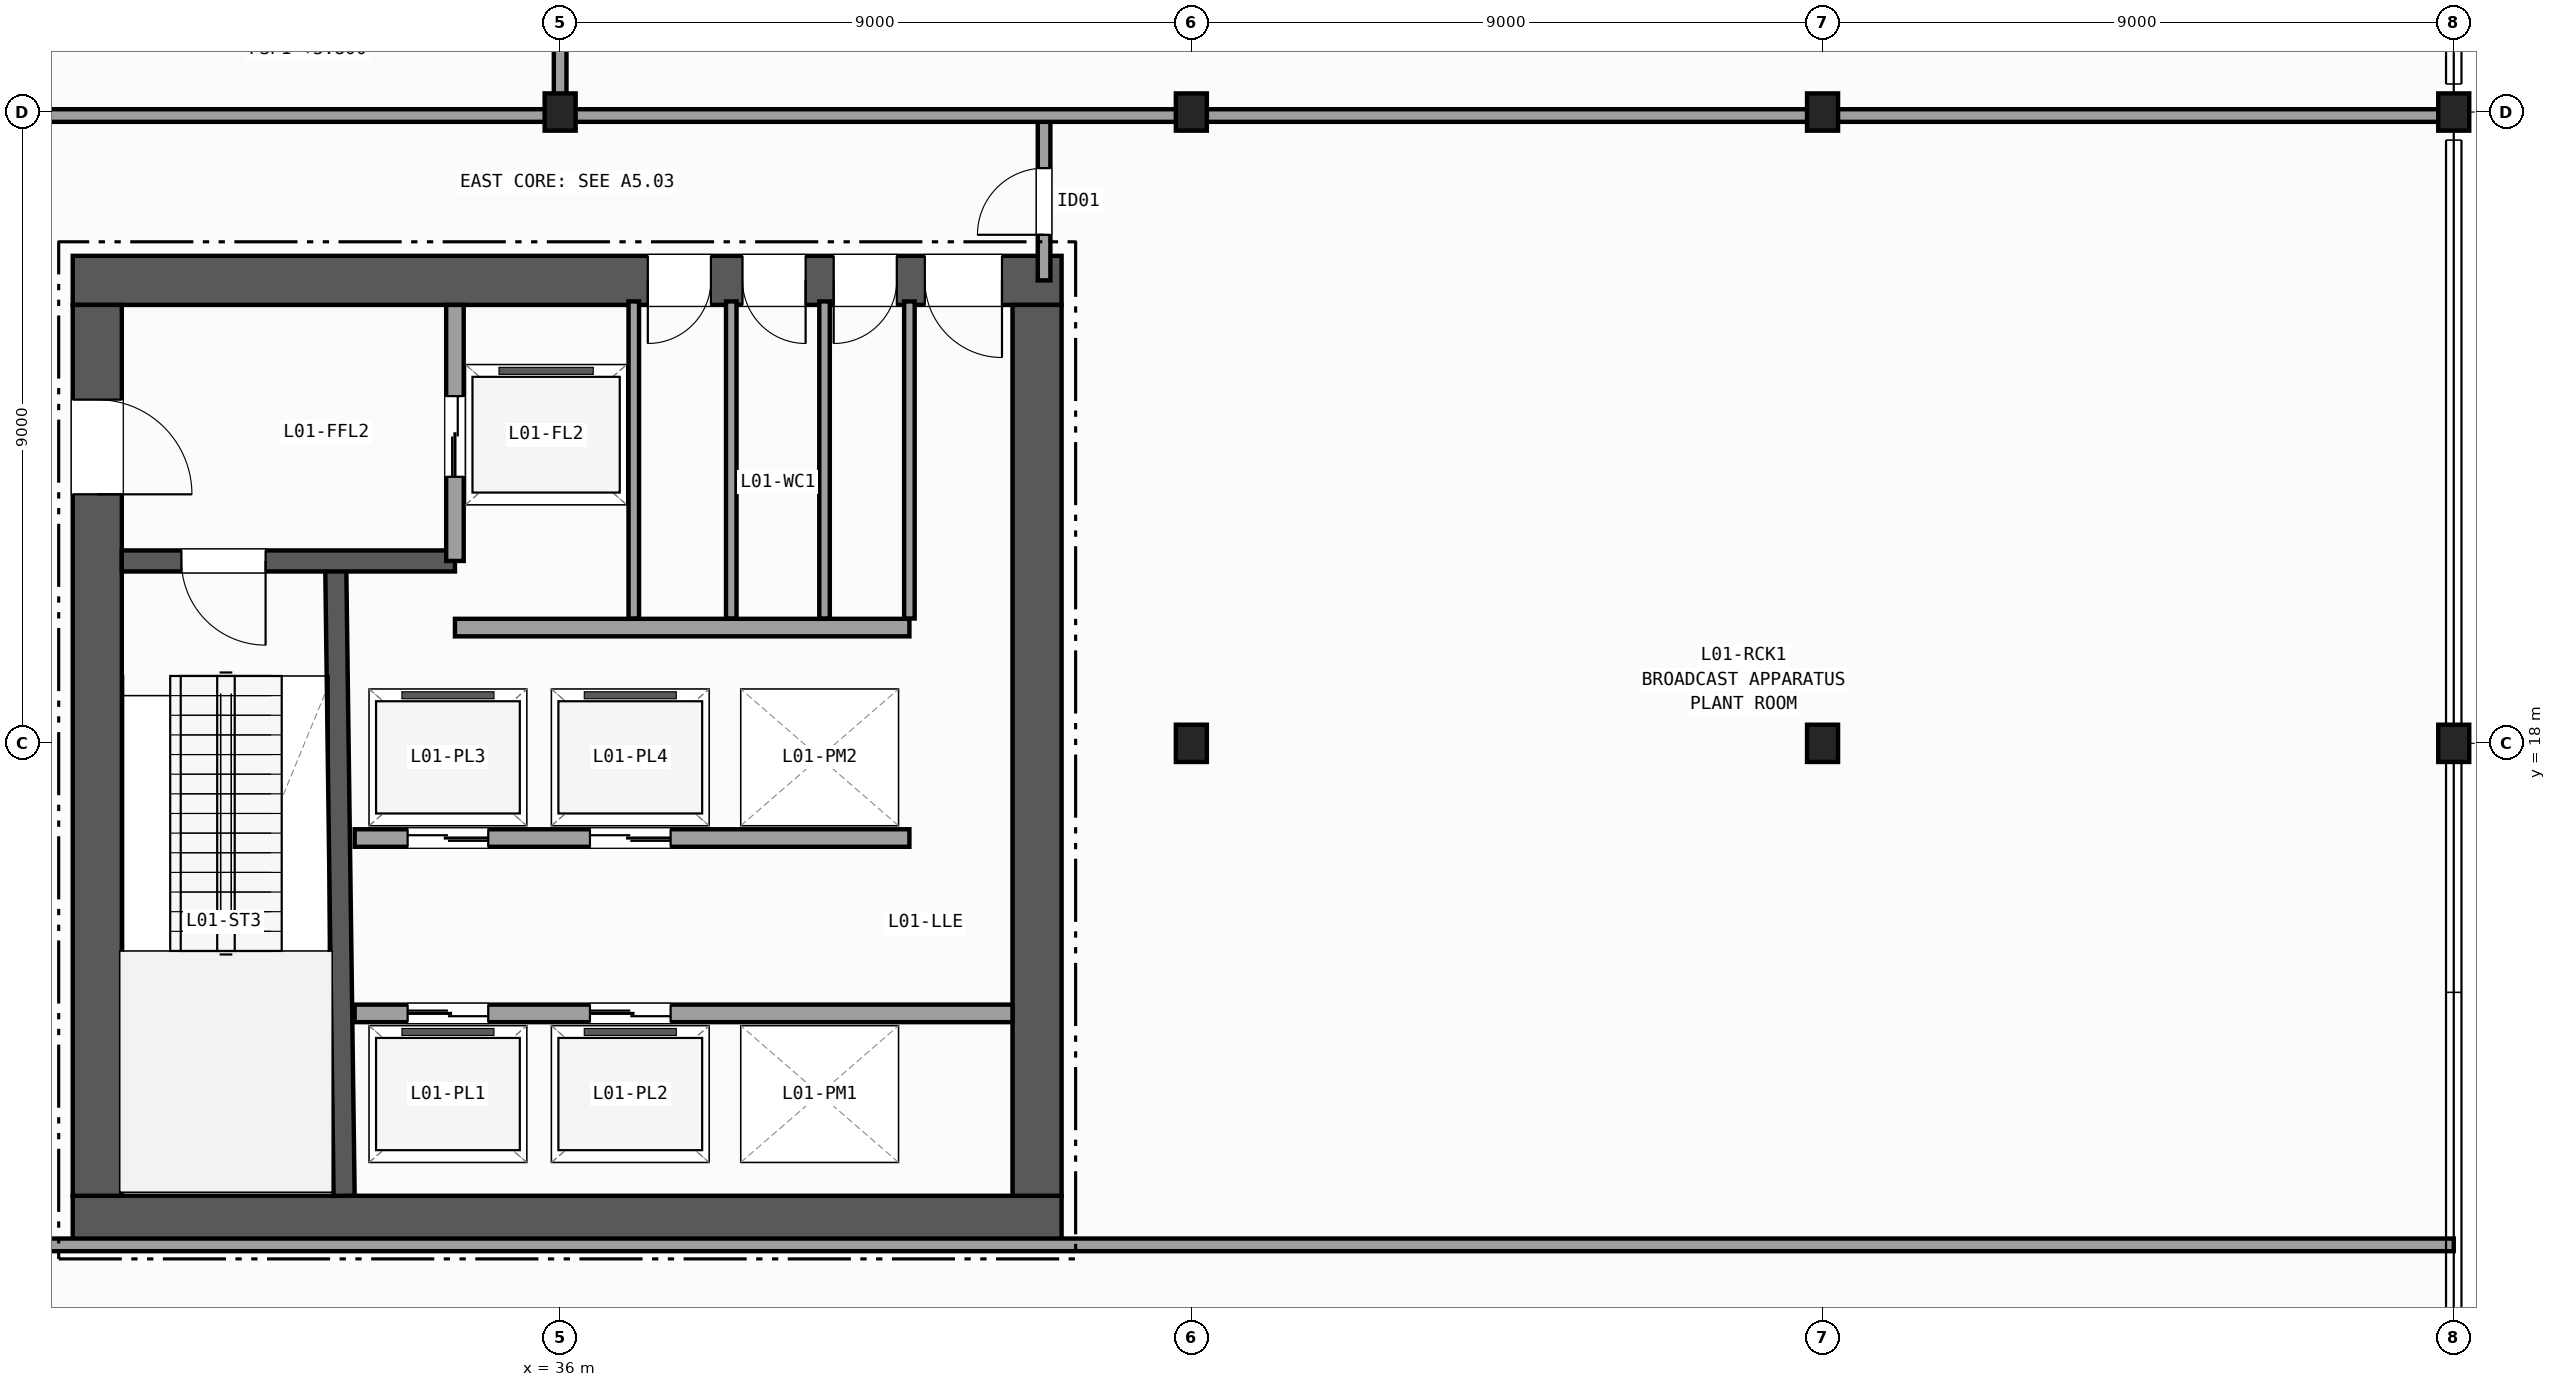
"""IFC4 building model, lengths in metres.
Left out: names, types, materials, properties, quantities, classifications, styles, units other than length and angle.
Written with IfcOpenShell. Run it as: python <this file> out.ifc"""

import sys

from ifc_helpers import new_model, si_unit, direction, frame, frame_2d, origin, origin_2d, place, context, subcontext, project, spatial, rectangle, i_section, extrude, element, fill, save


model = new_model("IFC4")
c1 = context("Model", 3, precision=1e-05, world=origin(), true_north=direction((0.0, 1.0)))
c2 = subcontext(c1, "Body", "Model", "MODEL_VIEW")
j1 = project(units=[si_unit("LENGTHUNIT", "METRE"), si_unit("PLANEANGLEUNIT", "RADIAN")], contexts=[c1])
p1 = place(None, origin())
s1 = spatial("IfcSite", under=j1, at=p1, CompositionType="ELEMENT")
p2 = place(p1, origin())
s2 = spatial("IfcBuilding", under=s1, at=p2, CompositionType="ELEMENT")
p3 = place(p2, frame((0.0, 0.0, 5.8)))
s3 = spatial("IfcBuildingStorey", under=s2, at=p3, CompositionType="ELEMENT", Elevation=5.8)
for number, where, z_axis, x_axis in (
    (1, (36.0, 27.0, 0.0), (0.0, 0.0, 1.0), (1.0, 0.0, 0.0)),
    (2, (45.0, 18.0, 0.0), (0.0, 0.0, 1.0), (1.0, 0.0, 0.0)),
    (3, (45.0, 27.0, 0.0), (0.0, 0.0, 1.0), (1.0, 0.0, 0.0)),
    (4, (54.0, 18.0, 0.0), (0.0, 0.0, 1.0), (1.0, 0.0, 0.0)),
    (5, (54.0, 27.0, 0.0), (0.0, 0.0, 1.0), (1.0, 0.0, 0.0)),
    (6, (63.0, 18.0, 0.0), (0.0, 0.0, 1.0), (1.0, 0.0, 0.0)),
    (7, (63.0, 27.0, 0.0), (0.0, 0.0, 1.0), (1.0, 0.0, 0.0)),
):
    element("IfcColumn", number, at=place(p3, frame(where, z_axis=z_axis, x_axis=x_axis)), inside=s3, PredefinedType="COLUMN", context=c2, shape_type="SweptSolid", body=[
        extrude(i_section(OverallWidth=0.442, OverallDepth=0.531, WebThickness=0.066, FlangeThickness=0.106, FilletRadius=0.015, at=origin_2d()), origin(), (0.0, 0.0, 1.0), 5.2),
    ])
p4 = place(p3, frame((29.05, 11.2, 0.0), z_axis=(0.0, 0.0, 1.0), x_axis=(1.0, 0.0, 0.0)))
e8 = element("IfcWall", 8, at=p4, inside=s3, PredefinedType="SHEAR", context=c2, shape_type="SweptSolid", body=[
    extrude(rectangle(XDim=14.1, YDim=0.7, at=frame_2d((7.05, 0.0))), origin(), (0.0, 0.0, 1.0), 4.88),
])
p5 = place(p3, frame((43.15, 24.6, 0.0), z_axis=(0.0, 0.0, 1.0), x_axis=(-1.0, 0.0, 0.0)))
e9 = element("IfcWall", 9, at=p5, inside=s3, PredefinedType="SHEAR", context=c2, shape_type="SweptSolid", body=[
    extrude(rectangle(XDim=14.1, YDim=0.7, at=frame_2d((7.05, 0.0))), origin(), (0.0, 0.0, 1.0), 4.88),
])
p6 = place(p5, frame((0.85, 0.0, 0.0)))
e10 = element("IfcOpeningElement", 10, at=p6, cuts=e9, PredefinedType="OPENING", context=c2, shape_type="SweptSolid", body=[
    extrude(rectangle(XDim=1.1, YDim=2.15, at=frame_2d((0.55, 1.075))), frame((0.0, 0.36, 0.0), z_axis=(0.0, -1.0, 0.0), x_axis=(1.0, 0.0, 0.0)), (0.0, 0.0, 1.0), 0.72),
])
p7 = place(p5, frame((2.35, 0.0, 0.0)))
e11 = element("IfcOpeningElement", 11, at=p7, cuts=e9, PredefinedType="OPENING", context=c2, shape_type="SweptSolid", body=[
    extrude(rectangle(XDim=0.9, YDim=2.1, at=frame_2d((0.45, 1.05))), frame((0.0, 0.36, 0.0), z_axis=(0.0, -1.0, 0.0), x_axis=(1.0, 0.0, 0.0)), (0.0, 0.0, 1.0), 0.72),
])
p8 = place(p5, frame((3.65, 0.0, 0.0)))
e12 = element("IfcOpeningElement", 12, at=p8, cuts=e9, PredefinedType="OPENING", context=c2, shape_type="SweptSolid", body=[
    extrude(rectangle(XDim=0.9, YDim=2.1, at=frame_2d((0.45, 1.05))), frame((0.0, 0.36, 0.0), z_axis=(0.0, -1.0, 0.0), x_axis=(1.0, 0.0, 0.0)), (0.0, 0.0, 1.0), 0.72),
])
p9 = place(p5, frame((5.0, 0.0, 0.0)))
e13 = element("IfcOpeningElement", 13, at=p9, cuts=e9, PredefinedType="OPENING", context=c2, shape_type="SweptSolid", body=[
    extrude(rectangle(XDim=0.9, YDim=2.1, at=frame_2d((0.45, 1.05))), frame((0.0, 0.36, 0.0), z_axis=(0.0, -1.0, 0.0), x_axis=(1.0, 0.0, 0.0)), (0.0, 0.0, 1.0), 0.72),
])
p10 = place(p3, frame((29.4, 24.25, 0.0), z_axis=(0.0, 0.0, 1.0), x_axis=(0.0, -1.0, 0.0)))
e14 = element("IfcWall", 14, at=p10, inside=s3, PredefinedType="SHEAR", context=c2, shape_type="SweptSolid", body=[
    extrude(rectangle(XDim=12.7, YDim=0.7, at=frame_2d((6.35, 0.0))), origin(), (0.0, 0.0, 1.0), 4.88),
])
p11 = place(p10, frame((1.35, 0.0, 0.0)))
e15 = element("IfcOpeningElement", 15, at=p11, cuts=e14, PredefinedType="OPENING", context=c2, shape_type="SweptSolid", body=[
    extrude(rectangle(XDim=1.35, YDim=2.15, at=frame_2d((0.675, 1.075))), frame((0.0, 0.36, 0.0), z_axis=(0.0, -1.0, 0.0), x_axis=(1.0, 0.0, 0.0)), (0.0, 0.0, 1.0), 0.72),
])
p12 = place(p3, frame((42.8, 11.55, 0.0), z_axis=(0.0, 0.0, 1.0), x_axis=(0.0, 1.0, 0.0)))
e16 = element("IfcWall", 16, at=p12, inside=s3, PredefinedType="SHEAR", context=c2, shape_type="SweptSolid", body=[
    extrude(rectangle(XDim=12.7, YDim=0.7, at=frame_2d((6.35, 0.0))), origin(), (0.0, 0.0, 1.0), 4.88),
])
p13 = place(p3, frame((32.92, 11.55, 0.0), z_axis=(0.0, 0.0, 1.0), x_axis=(-0.01331804616, 0.99991131089, 0.0)))
e17 = element("IfcWall", 17, at=p13, inside=s3, PredefinedType="SHEAR", context=c2, shape_type="SweptSolid", body=[
    extrude(rectangle(XDim=9.001, YDim=0.3, at=frame_2d((4.5, 0.0))), origin(), (0.0, 0.0, 1.0), 4.88),
])
p14 = place(p3, frame((34.5, 20.6, 0.0), z_axis=(0.0, 0.0, 1.0), x_axis=(-1.0, 0.0, 0.0)))
e18 = element("IfcWall", 18, at=p14, inside=s3, PredefinedType="SHEAR", context=c2, shape_type="SweptSolid", body=[
    extrude(rectangle(XDim=4.75, YDim=0.3, at=frame_2d((2.375, 0.0))), origin(), (0.0, 0.0, 1.0), 4.88),
])
p15 = place(p14, frame((2.7, 0.0, 0.0)))
e19 = element("IfcOpeningElement", 19, at=p15, cuts=e18, PredefinedType="OPENING", context=c2, shape_type="SweptSolid", body=[
    extrude(rectangle(XDim=1.2, YDim=2.15, at=frame_2d((0.6, 1.075))), frame((0.0, 0.16, 0.0), z_axis=(0.0, -1.0, 0.0), x_axis=(1.0, 0.0, 0.0)), (0.0, 0.0, 1.0), 0.32),
])
p16 = place(p3, frame((34.5, 20.6, 0.0), z_axis=(0.0, 0.0, 1.0), x_axis=(0.0, 1.0, 0.0)))
e20 = element("IfcWall", 20, at=p16, inside=s3, PredefinedType="PARTITIONING", context=c2, shape_type="SweptSolid", body=[
    extrude(rectangle(XDim=3.65, YDim=0.25, at=frame_2d((1.825, 0.0))), origin(), (0.0, 0.0, 1.0), 4.88),
])
p17 = place(p16, frame((1.2, 0.0, 0.0)))
e21 = element("IfcOpeningElement", 21, at=p17, cuts=e20, PredefinedType="OPENING", context=c2, shape_type="SweptSolid", body=[
    extrude(rectangle(XDim=1.15, YDim=2.15, at=frame_2d((0.575, 1.075))), frame((0.0, 0.135, 0.0), z_axis=(0.0, -1.0, 0.0), x_axis=(1.0, 0.0, 0.0)), (0.0, 0.0, 1.0), 0.27),
])
p18 = place(p3, frame((34.5, 19.65, 0.0), z_axis=(0.0, 0.0, 1.0), x_axis=(1.0, 0.0, 0.0)))
e22 = element("IfcWall", 22, at=p18, inside=s3, PredefinedType="PARTITIONING", context=c2, shape_type="SweptSolid", body=[
    extrude(rectangle(XDim=6.48, YDim=0.25, at=frame_2d((3.24, 0.0))), origin(), (0.0, 0.0, 1.0), 4.88),
])
p19 = place(p3, frame((33.07, 14.15, 0.0), z_axis=(0.0, 0.0, 1.0), x_axis=(1.0, 0.0, 0.0)))
e23 = element("IfcWall", 23, at=p19, inside=s3, PredefinedType="PARTITIONING", context=c2, shape_type="SweptSolid", body=[
    extrude(rectangle(XDim=9.38, YDim=0.25, at=frame_2d((4.69, 0.0))), origin(), (0.0, 0.0, 1.0), 4.88),
])
p20 = place(p19, frame((0.755, 0.0, 0.0)))
e24 = element("IfcOpeningElement", 24, at=p20, cuts=e23, PredefinedType="OPENING", context=c2, shape_type="SweptSolid", body=[
    extrude(rectangle(XDim=1.15, YDim=2.15, at=frame_2d((0.575, 1.075))), frame((0.0, 0.135, 0.0), z_axis=(0.0, -1.0, 0.0), x_axis=(1.0, 0.0, 0.0)), (0.0, 0.0, 1.0), 0.27),
])
p21 = place(p19, frame((3.355, 0.0, 0.0)))
e25 = element("IfcOpeningElement", 25, at=p21, cuts=e23, PredefinedType="OPENING", context=c2, shape_type="SweptSolid", body=[
    extrude(rectangle(XDim=1.15, YDim=2.15, at=frame_2d((0.575, 1.075))), frame((0.0, 0.135, 0.0), z_axis=(0.0, -1.0, 0.0), x_axis=(1.0, 0.0, 0.0)), (0.0, 0.0, 1.0), 0.27),
])
p22 = place(p3, frame((40.98, 16.65, 0.0), z_axis=(0.0, 0.0, 1.0), x_axis=(-1.0, 0.0, 0.0)))
e26 = element("IfcWall", 26, at=p22, inside=s3, PredefinedType="PARTITIONING", context=c2, shape_type="SweptSolid", body=[
    extrude(rectangle(XDim=7.91, YDim=0.25, at=frame_2d((3.955, 0.0))), origin(), (0.0, 0.0, 1.0), 4.88),
])
p23 = place(p22, frame((6.005, 0.0, 0.0)))
e27 = element("IfcOpeningElement", 27, at=p23, cuts=e26, PredefinedType="OPENING", context=c2, shape_type="SweptSolid", body=[
    extrude(rectangle(XDim=1.15, YDim=2.15, at=frame_2d((0.575, 1.075))), frame((0.0, 0.135, 0.0), z_axis=(0.0, -1.0, 0.0), x_axis=(1.0, 0.0, 0.0)), (0.0, 0.0, 1.0), 0.27),
])
p24 = place(p22, frame((3.405, 0.0, 0.0)))
e28 = element("IfcOpeningElement", 28, at=p24, cuts=e26, PredefinedType="OPENING", context=c2, shape_type="SweptSolid", body=[
    extrude(rectangle(XDim=1.15, YDim=2.15, at=frame_2d((0.575, 1.075))), frame((0.0, 0.135, 0.0), z_axis=(0.0, -1.0, 0.0), x_axis=(1.0, 0.0, 0.0)), (0.0, 0.0, 1.0), 0.27),
])
for number, where, z_axis, x_axis in (
    (29, (37.05, 19.78, 0.0), (0.0, 0.0, 1.0), (0.0, 1.0, 0.0)),
    (30, (38.44, 19.78, 0.0), (0.0, 0.0, 1.0), (0.0, 1.0, 0.0)),
    (31, (39.77, 19.78, 0.0), (0.0, 0.0, 1.0), (0.0, 1.0, 0.0)),
    (32, (40.98, 19.78, 0.0), (0.0, 0.0, 1.0), (0.0, 1.0, 0.0)),
):
    element("IfcWall", number, at=place(p3, frame(where, z_axis=z_axis, x_axis=x_axis)), inside=s3, PredefinedType="PARTITIONING", context=c2, shape_type="SweptSolid", body=[
        extrude(rectangle(XDim=4.52, YDim=0.15, at=frame_2d((2.26, 0.0))), origin(), (0.0, 0.0, 1.0), 4.88),
    ])
p25 = place(p3, frame((24.65, 10.85, 0.0), z_axis=(0.0, 0.0, 1.0), x_axis=(1.0, 0.0, 0.0)))
e33 = element("IfcWall", 33, at=p25, inside=s3, PredefinedType="PARTITIONING", context=c2, shape_type="SweptSolid", body=[
    extrude(rectangle(XDim=38.35, YDim=0.18, at=frame_2d((19.175, 0.0))), origin(), (0.0, 0.0, 1.0), 4.005),
])
p26 = place(p25, frame((2.0, 0.0, 0.0)))
e34 = element("IfcOpeningElement", 34, at=p26, cuts=e33, PredefinedType="OPENING", context=c2, shape_type="SweptSolid", body=[
    extrude(rectangle(XDim=1.2, YDim=2.15, at=frame_2d((0.6, 1.075))), frame((0.0, 0.1, 0.0), z_axis=(0.0, -1.0, 0.0), x_axis=(1.0, 0.0, 0.0)), (0.0, 0.0, 1.0), 0.2),
])
p27 = place(p3, frame((42.9, 24.6, 0.0), z_axis=(0.0, 0.0, 1.0), x_axis=(0.0, 1.0, 0.0)))
e35 = element("IfcWall", 35, at=p27, inside=s3, PredefinedType="PARTITIONING", context=c2, shape_type="SweptSolid", body=[
    extrude(rectangle(XDim=2.35, YDim=0.18, at=frame_2d((1.175, 0.0))), origin(), (0.0, 0.0, 1.0), 3.933),
])
p28 = place(p27, frame((0.65, 0.0, 0.0)))
e36 = element("IfcOpeningElement", 36, at=p28, cuts=e35, PredefinedType="OPENING", context=c2, shape_type="SweptSolid", body=[
    extrude(rectangle(XDim=0.95, YDim=2.1, at=frame_2d((0.475, 1.05))), frame((0.0, 0.1, 0.0), z_axis=(0.0, -1.0, 0.0), x_axis=(1.0, 0.0, 0.0)), (0.0, 0.0, 1.0), 0.2),
])
p29 = place(p3, frame((27.1, 26.95, 0.0), z_axis=(0.0, 0.0, 1.0), x_axis=(1.0, 0.0, 0.0)))
e37 = element("IfcWall", 37, at=p29, inside=s3, PredefinedType="PARTITIONING", context=c2, shape_type="SweptSolid", body=[
    extrude(rectangle(XDim=35.9, YDim=0.18, at=frame_2d((17.95, 0.0))), origin(), (0.0, 0.0, 1.0), 3.933),
])
p30 = place(p3, frame((36.0, 26.95, 0.0), z_axis=(0.0, 0.0, 1.0), x_axis=(0.0, 1.0, 0.0)))
e38 = element("IfcWall", 38, at=p30, inside=s3, PredefinedType="PARTITIONING", context=c2, shape_type="SweptSolid", body=[
    extrude(rectangle(XDim=27.05, YDim=0.18, at=frame_2d((13.525, 0.0))), origin(), (0.0, 0.0, 1.0), 3.933),
])
p31 = place(p30, frame((4.5, 0.0, 0.0)))
e39 = element("IfcOpeningElement", 39, at=p31, cuts=e38, PredefinedType="OPENING", context=c2, shape_type="SweptSolid", body=[
    extrude(rectangle(XDim=1.2, YDim=2.15, at=frame_2d((0.6, 1.075))), frame((0.0, 0.1, 0.0), z_axis=(0.0, -1.0, 0.0), x_axis=(1.0, 0.0, 0.0)), (0.0, 0.0, 1.0), 0.2),
])
p32 = place(p15, origin())
e40 = element("IfcDoor", 40, at=p32, inside=s3, OperationType="SINGLE_SWING_LEFT", PredefinedType="DOOR", context=c2, shape_type="SweptSolid", body=[
    extrude(rectangle(XDim=1.2, YDim=2.15, at=frame_2d((0.6, 1.075))), frame((0.0, 0.025, 0.0), z_axis=(0.0, -1.0, 0.0), x_axis=(1.0, 0.0, 0.0)), (0.0, 0.0, 1.0), 0.05),
])
fill(e19, e40)
p33 = place(p11, origin())
e41 = element("IfcDoor", 41, at=p33, inside=s3, OperationType="SINGLE_SWING_RIGHT", PredefinedType="DOOR", context=c2, shape_type="SweptSolid", body=[
    extrude(rectangle(XDim=1.35, YDim=2.15, at=frame_2d((0.675, 1.075))), frame((0.0, 0.025, 0.0), z_axis=(0.0, -1.0, 0.0), x_axis=(1.0, 0.0, 0.0)), (0.0, 0.0, 1.0), 0.05),
])
fill(e15, e41)
p34 = place(p6, origin())
e42 = element("IfcDoor", 42, at=p34, inside=s3, OperationType="SINGLE_SWING_LEFT", PredefinedType="DOOR", context=c2, shape_type="SweptSolid", body=[
    extrude(rectangle(XDim=1.1, YDim=2.15, at=frame_2d((0.55, 1.075))), frame((0.0, 0.025, 0.0), z_axis=(0.0, -1.0, 0.0), x_axis=(1.0, 0.0, 0.0)), (0.0, 0.0, 1.0), 0.05),
])
fill(e10, e42)
p35 = place(p7, origin())
e43 = element("IfcDoor", 43, at=p35, inside=s3, OperationType="SINGLE_SWING_RIGHT", PredefinedType="DOOR", context=c2, shape_type="SweptSolid", body=[
    extrude(rectangle(XDim=0.9, YDim=2.1, at=frame_2d((0.45, 1.05))), frame((0.0, 0.025, 0.0), z_axis=(0.0, -1.0, 0.0), x_axis=(1.0, 0.0, 0.0)), (0.0, 0.0, 1.0), 0.05),
])
fill(e11, e43)
p36 = place(p8, origin())
e44 = element("IfcDoor", 44, at=p36, inside=s3, OperationType="SINGLE_SWING_LEFT", PredefinedType="DOOR", context=c2, shape_type="SweptSolid", body=[
    extrude(rectangle(XDim=0.9, YDim=2.1, at=frame_2d((0.45, 1.05))), frame((0.0, 0.025, 0.0), z_axis=(0.0, -1.0, 0.0), x_axis=(1.0, 0.0, 0.0)), (0.0, 0.0, 1.0), 0.05),
])
fill(e12, e44)
p37 = place(p9, origin())
e45 = element("IfcDoor", 45, at=p37, inside=s3, OperationType="SINGLE_SWING_RIGHT", PredefinedType="DOOR", context=c2, shape_type="SweptSolid", body=[
    extrude(rectangle(XDim=0.9, YDim=2.1, at=frame_2d((0.45, 1.05))), frame((0.0, 0.025, 0.0), z_axis=(0.0, -1.0, 0.0), x_axis=(1.0, 0.0, 0.0)), (0.0, 0.0, 1.0), 0.05),
])
fill(e13, e45)
p38 = place(p17, origin())
e46 = element("IfcDoor", 46, at=p38, inside=s3, OperationType="DOUBLE_DOOR_SLIDING", PredefinedType="DOOR", context=c2, shape_type="SweptSolid", body=[
    extrude(rectangle(XDim=1.15, YDim=2.15, at=frame_2d((0.575, 1.075))), frame((0.0, 0.025, 0.0), z_axis=(0.0, -1.0, 0.0), x_axis=(1.0, 0.0, 0.0)), (0.0, 0.0, 1.0), 0.05),
])
fill(e21, e46)
p39 = place(p20, origin())
e47 = element("IfcDoor", 47, at=p39, inside=s3, OperationType="DOUBLE_DOOR_SLIDING", PredefinedType="DOOR", context=c2, shape_type="SweptSolid", body=[
    extrude(rectangle(XDim=1.15, YDim=2.15, at=frame_2d((0.575, 1.075))), frame((0.0, 0.025, 0.0), z_axis=(0.0, -1.0, 0.0), x_axis=(1.0, 0.0, 0.0)), (0.0, 0.0, 1.0), 0.05),
])
fill(e24, e47)
p40 = place(p21, origin())
e48 = element("IfcDoor", 48, at=p40, inside=s3, OperationType="DOUBLE_DOOR_SLIDING", PredefinedType="DOOR", context=c2, shape_type="SweptSolid", body=[
    extrude(rectangle(XDim=1.15, YDim=2.15, at=frame_2d((0.575, 1.075))), frame((0.0, 0.025, 0.0), z_axis=(0.0, -1.0, 0.0), x_axis=(1.0, 0.0, 0.0)), (0.0, 0.0, 1.0), 0.05),
])
fill(e25, e48)
p41 = place(p23, origin())
e49 = element("IfcDoor", 49, at=p41, inside=s3, OperationType="DOUBLE_DOOR_SLIDING", PredefinedType="DOOR", context=c2, shape_type="SweptSolid", body=[
    extrude(rectangle(XDim=1.15, YDim=2.15, at=frame_2d((0.575, 1.075))), frame((0.0, 0.025, 0.0), z_axis=(0.0, -1.0, 0.0), x_axis=(1.0, 0.0, 0.0)), (0.0, 0.0, 1.0), 0.05),
])
fill(e27, e49)
p42 = place(p24, origin())
e50 = element("IfcDoor", 50, at=p42, inside=s3, OperationType="DOUBLE_DOOR_SLIDING", PredefinedType="DOOR", context=c2, shape_type="SweptSolid", body=[
    extrude(rectangle(XDim=1.15, YDim=2.15, at=frame_2d((0.575, 1.075))), frame((0.0, 0.025, 0.0), z_axis=(0.0, -1.0, 0.0), x_axis=(1.0, 0.0, 0.0)), (0.0, 0.0, 1.0), 0.05),
])
fill(e28, e50)
p43 = place(p28, origin())
e51 = element("IfcDoor", 51, at=p43, inside=s3, OperationType="SINGLE_SWING_LEFT", PredefinedType="DOOR", context=c2, shape_type="SweptSolid", body=[
    extrude(rectangle(XDim=0.95, YDim=2.1, at=frame_2d((0.475, 1.05))), frame((0.0, 0.025, 0.0), z_axis=(0.0, -1.0, 0.0), x_axis=(1.0, 0.0, 0.0)), (0.0, 0.0, 1.0), 0.05),
])
fill(e36, e51)
save(model, sys.argv[1])
